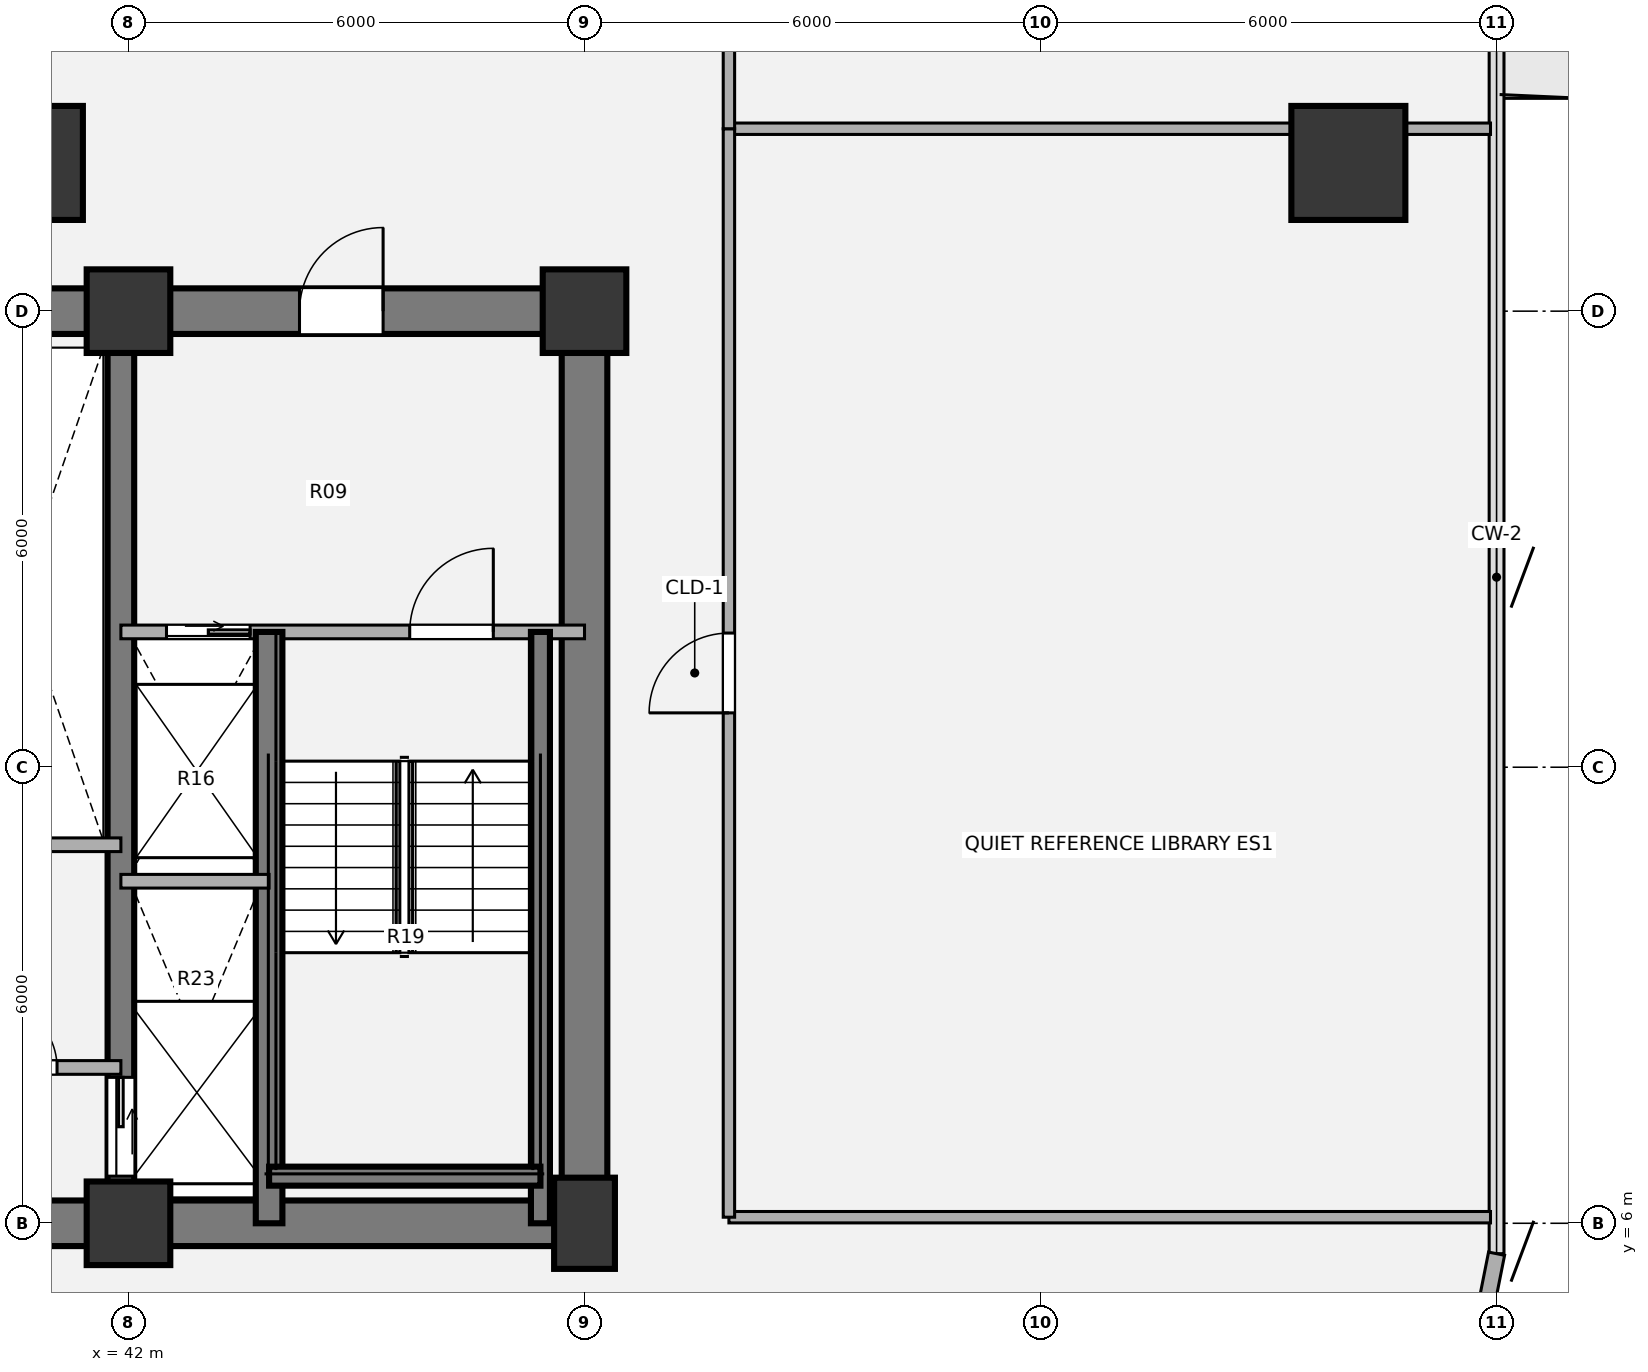
"""IFC4 building model, lengths in metres.
Left out: names, types, materials, properties, quantities, classifications, styles, units other than length and angle.
Written with IfcOpenShell. Run it as: python <this file> out.ifc"""

import sys

from ifc_helpers import new_model, si_unit, direction, frame, frame_2d, origin, origin_2d, place, context, subcontext, project, spatial, rectangle, hollow_circle, extrude, source, transform, mapped, element, fill, save


model = new_model("IFC4")
c1 = context("Model", 3, precision=1e-05, world=origin(), true_north=direction((0.0, 1.0)))
c2 = subcontext(c1, "Body", "Model", "MODEL_VIEW")
j1 = project(units=[si_unit("LENGTHUNIT", "METRE"), si_unit("PLANEANGLEUNIT", "RADIAN")], contexts=[c1])
p1 = place(None, origin())
s1 = spatial("IfcSite", under=j1, at=p1, CompositionType="ELEMENT")
p2 = place(p1, origin())
s2 = spatial("IfcBuilding", under=s1, at=p2, CompositionType="ELEMENT")
p3 = place(p2, frame((0.0, 0.0, 61.02)))
s3 = spatial("IfcBuildingStorey", under=s2, at=p3, CompositionType="ELEMENT", Elevation=61.02)
m1 = source(origin(), c2, "Body", "SweptSolid", [
    extrude(rectangle(XDim=1.1, YDim=1.1, at=origin_2d()), origin(), (0.0, 0.0, 1.0), 3.78),
])
p4 = place(p3, frame((42.0, 6.0, 0.0), z_axis=(0.0, 0.0, 1.0), x_axis=(1.0, 0.0, 0.0)))
e1 = element("IfcColumn", 1, at=p4, inside=s3, PredefinedType="COLUMN", context=c2, shape_type="MappedRepresentation", body=[
    mapped(m1, transform((0.0, 0.0, 0.0), x_axis=(1.0, 0.0, 0.0), y_axis=(0.0, 1.0, 0.0), z_axis=(0.0, 0.0, 1.0), scale=1.0)),
])
m2 = source(origin(), c2, "Body", "SweptSolid", [
    extrude(rectangle(XDim=0.8, YDim=1.2, at=origin_2d()), origin(), (0.0, 0.0, 1.0), 3.78),
])
p5 = place(p3, frame((48.0, 6.0, 0.0), z_axis=(0.0, 0.0, 1.0), x_axis=(1.0, 0.0, 0.0)))
e2 = element("IfcColumn", 2, at=p5, inside=s3, PredefinedType="COLUMN", context=c2, shape_type="MappedRepresentation", body=[
    mapped(m2, transform((0.0, 0.0, 0.0), x_axis=(1.0, 0.0, 0.0), y_axis=(0.0, 1.0, 0.0), z_axis=(0.0, 0.0, 1.0), scale=1.0)),
])
for number, where, z_axis, x_axis in (
    (3, (42.0, 18.0, 0.0), (0.0, 0.0, 1.0), (1.0, 0.0, 0.0)),
    (4, (48.0, 18.0, 0.0), (0.0, 0.0, 1.0), (1.0, 0.0, 0.0)),
):
    element("IfcColumn", number, at=place(p3, frame(where, z_axis=z_axis, x_axis=x_axis)), inside=s3, PredefinedType="COLUMN", context=c2, shape_type="MappedRepresentation", body=[
        mapped(m1, transform((0.0, 0.0, 0.0), x_axis=(1.0, 0.0, 0.0), y_axis=(0.0, 1.0, 0.0), z_axis=(0.0, 0.0, 1.0), scale=1.0)),
    ])
p6 = place(p3, frame((48.3, 6.0, 0.0), z_axis=(0.0, 0.0, 1.0), x_axis=(-1.0, 0.0, 0.0)))
e5 = element("IfcWall", 5, at=p6, inside=s3, PredefinedType="SHEAR", context=c2, shape_type="SweptSolid", body=[
    extrude(rectangle(XDim=24.6, YDim=0.6, at=frame_2d((12.3, 0.0))), origin(), (0.0, 0.0, 1.0), 3.78),
])
p7 = place(p3, frame((48.0, 18.0, 0.0), z_axis=(0.0, 0.0, 1.0), x_axis=(0.0, -1.0, 0.0)))
e6 = element("IfcWall", 6, at=p7, inside=s3, PredefinedType="SHEAR", context=c2, shape_type="SweptSolid", body=[
    extrude(rectangle(XDim=12.0, YDim=0.6, at=frame_2d((6.0, 0.0))), origin(), (0.0, 0.0, 1.0), 3.78),
])
p8 = place(p3, frame((38.8, 18.0, 0.0), z_axis=(0.0, 0.0, 1.0), x_axis=(1.0, 0.0, 0.0)))
e7 = element("IfcWall", 7, at=p8, inside=s3, PredefinedType="SHEAR", context=c2, shape_type="SweptSolid", body=[
    extrude(rectangle(XDim=9.5, YDim=0.6, at=frame_2d((4.75, 0.0))), origin(), (0.0, 0.0, 1.0), 3.78),
])
p9 = place(p8, frame((5.45, 0.0, 0.0)))
e8 = element("IfcOpeningElement", 8, at=p9, cuts=e7, PredefinedType="OPENING", context=c2, shape_type="SweptSolid", body=[
    extrude(rectangle(XDim=1.1, YDim=2.1, at=origin_2d()), frame((0.55, 0.31, 1.05), z_axis=(0.0, -1.0, 0.0), x_axis=(1.0, 0.0, 0.0)), (0.0, 0.0, 1.0), 0.62),
])
p10 = place(p3, frame((41.9, 18.0, 0.0), z_axis=(0.0, 0.0, 1.0), x_axis=(0.0, -1.0, 0.0)))
e9 = element("IfcWall", 9, at=p10, inside=s3, PredefinedType="SHEAR", context=c2, shape_type="SweptSolid", body=[
    extrude(rectangle(XDim=12.0, YDim=0.35, at=frame_2d((6.0, 0.0))), origin(), (0.0, 0.0, 1.0), 3.78),
])
p11 = place(p10, frame((10.08, 0.0, 0.0)))
e10 = element("IfcOpeningElement", 10, at=p11, cuts=e9, PredefinedType="OPENING", context=c2, shape_type="SweptSolid", body=[
    extrude(rectangle(XDim=1.3, YDim=2.1, at=origin_2d()), frame((0.65, 0.185, 1.05), z_axis=(0.0, -1.0, 0.0), x_axis=(1.0, 0.0, 0.0)), (0.0, 0.0, 1.0), 0.37),
])
m3 = source(origin(), c2, "Body", "SweptSolid", [
    extrude(hollow_circle(Radius=0.75, WallThickness=0.05, at=origin_2d()), origin(), (0.0, 0.0, 1.0), 3.78),
])
for number, where, z_axis, x_axis in (
    (11, (58.05, 19.95, 0.0), (0.0, 0.0, 1.0), (1.0, 0.0, 0.0)),
    (12, (40.65, 19.95, 0.0), (0.0, 0.0, 1.0), (1.0, 0.0, 0.0)),
):
    element("IfcColumn", number, at=place(p3, frame(where, z_axis=z_axis, x_axis=x_axis)), inside=s3, PredefinedType="COLUMN", context=c2, shape_type="MappedRepresentation", body=[
        mapped(m3, transform((0.0, 0.0, 0.0), x_axis=(1.0, 0.0, 0.0), y_axis=(0.0, 1.0, 0.0), z_axis=(0.0, 0.0, 1.0), scale=1.0)),
    ])
p12 = place(p3, frame((60.0, 5.6, 0.0), z_axis=(0.0, 0.0, 1.0), x_axis=(-0.195138390419, -0.980775717779, 0.0)))
e13 = element("IfcWall", 13, at=p12, inside=s3, PredefinedType="SOLIDWALL", context=c2, shape_type="SweptSolid", body=[
    extrude(rectangle(XDim=1.249, YDim=0.215, at=frame_2d((0.624, 0.0))), origin(), (0.0, 0.0, 1.0), 3.53),
])
p13 = place(p3, frame((39.35, 10.98, 0.0), z_axis=(0.0, 0.0, 1.0), x_axis=(1.0, 0.0, 0.0)))
e14 = element("IfcWall", 14, at=p13, inside=s3, PredefinedType="PARTITIONING", context=c2, shape_type="SweptSolid", body=[
    extrude(rectangle(XDim=2.55, YDim=0.18, at=frame_2d((1.275, 0.0))), origin(), (0.0, 0.0, 1.0), 3.5),
])
p14 = place(p3, frame((39.35, 8.05, 0.0), z_axis=(0.0, 0.0, 1.0), x_axis=(1.0, 0.0, 0.0)))
e15 = element("IfcWall", 15, at=p14, inside=s3, PredefinedType="PARTITIONING", context=c2, shape_type="SweptSolid", body=[
    extrude(rectangle(XDim=2.55, YDim=0.18, at=frame_2d((1.275, 0.0))), origin(), (0.0, 0.0, 1.0), 3.5),
])
p15 = place(p14, frame((0.85, 0.0, 0.0)))
e16 = element("IfcOpeningElement", 16, at=p15, cuts=e15, PredefinedType="OPENING", context=c2, shape_type="SweptSolid", body=[
    extrude(rectangle(XDim=0.86, YDim=2.1, at=origin_2d()), frame((0.43, 0.1, 1.05), z_axis=(0.0, -1.0, 0.0), x_axis=(1.0, 0.0, 0.0)), (0.0, 0.0, 1.0), 0.2),
])
p16 = place(p3, frame((41.9, 13.78, 0.0), z_axis=(0.0, 0.0, 1.0), x_axis=(1.0, 0.0, 0.0)))
e17 = element("IfcWall", 17, at=p16, inside=s3, PredefinedType="PARTITIONING", context=c2, shape_type="SweptSolid", body=[
    extrude(rectangle(XDim=6.1, YDim=0.18, at=frame_2d((3.05, 0.0))), origin(), (0.0, 0.0, 1.0), 3.5),
])
p17 = place(p16, frame((0.6, 0.0, 0.0)))
e18 = element("IfcOpeningElement", 18, at=p17, cuts=e17, PredefinedType="OPENING", context=c2, shape_type="SweptSolid", body=[
    extrude(rectangle(XDim=1.1, YDim=2.1, at=origin_2d()), frame((0.55, 0.1, 1.05), z_axis=(0.0, -1.0, 0.0), x_axis=(1.0, 0.0, 0.0)), (0.0, 0.0, 1.0), 0.2),
])
p18 = place(p16, frame((3.8, 0.0, 0.0)))
e19 = element("IfcOpeningElement", 19, at=p18, cuts=e17, PredefinedType="OPENING", context=c2, shape_type="SweptSolid", body=[
    extrude(rectangle(XDim=1.1, YDim=2.1, at=origin_2d()), frame((0.55, 0.1, 1.05), z_axis=(0.0, -1.0, 0.0), x_axis=(1.0, 0.0, 0.0)), (0.0, 0.0, 1.0), 0.2),
])
p19 = place(p3, frame((43.85, 6.0, 0.0), z_axis=(0.0, 0.0, 1.0), x_axis=(0.0, 1.0, 0.0)))
e20 = element("IfcWall", 20, at=p19, inside=s3, PredefinedType="SHEAR", context=c2, shape_type="SweptSolid", body=[
    extrude(rectangle(XDim=7.78, YDim=0.35, at=frame_2d((3.89, 0.0))), origin(), (0.0, 0.0, 1.0), 3.85),
])
p20 = place(p3, frame((47.42, 6.0, 0.0), z_axis=(0.0, 0.0, 1.0), x_axis=(0.0, 1.0, 0.0)))
e21 = element("IfcWall", 21, at=p20, inside=s3, PredefinedType="SHEAR", context=c2, shape_type="SweptSolid", body=[
    extrude(rectangle(XDim=7.78, YDim=0.25, at=frame_2d((3.89, 0.0))), origin(), (0.0, 0.0, 1.0), 3.85),
])
p21 = place(p3, frame((43.85, 6.62, 0.0), z_axis=(0.0, 0.0, 1.0), x_axis=(1.0, 0.0, 0.0)))
e22 = element("IfcWall", 22, at=p21, inside=s3, PredefinedType="SHEAR", context=c2, shape_type="SweptSolid", body=[
    extrude(rectangle(XDim=3.57, YDim=0.25, at=frame_2d((1.785, 0.0))), origin(), (0.0, 0.0, 1.0), 3.85),
])
p22 = place(p3, frame((41.9, 10.5, 0.0), z_axis=(0.0, 0.0, 1.0), x_axis=(1.0, 0.0, 0.0)))
e23 = element("IfcWall", 23, at=p22, inside=s3, PredefinedType="PARTITIONING", context=c2, shape_type="SweptSolid", body=[
    extrude(rectangle(XDim=1.95, YDim=0.18, at=frame_2d((0.975, 0.0))), origin(), (0.0, 0.0, 1.0), 3.5),
])
p23 = place(p3, frame((49.9, 6.08, 0.0), z_axis=(0.0, 0.0, 1.0), x_axis=(1.0, 0.0, 0.0)))
e24 = element("IfcWall", 24, at=p23, inside=s3, PredefinedType="PARTITIONING", context=c2, shape_type="SweptSolid", body=[
    extrude(rectangle(XDim=10.02, YDim=0.15, at=frame_2d((5.01, 0.0))), origin(), (0.0, 0.0, 1.0), 3.5),
])
p24 = place(p3, frame((49.9, 20.4, 0.0), z_axis=(0.0, 0.0, 1.0), x_axis=(1.0, 0.0, 0.0)))
e25 = element("IfcWall", 25, at=p24, inside=s3, PredefinedType="PARTITIONING", context=c2, shape_type="SweptSolid", body=[
    extrude(rectangle(XDim=10.02, YDim=0.15, at=frame_2d((5.01, 0.0))), origin(), (0.0, 0.0, 1.0), 2.982),
])
p25 = place(p3, frame((49.9, 6.08, 0.0), z_axis=(0.0, 0.0, 1.0), x_axis=(0.0, 1.0, 0.0)))
e26 = element("IfcWall", 26, at=p25, inside=s3, PredefinedType="PARTITIONING", context=c2, shape_type="SweptSolid", body=[
    extrude(rectangle(XDim=14.32, YDim=0.15, at=frame_2d((7.16, 0.0))), origin(), (0.0, 0.0, 1.0), 3.5),
])
p26 = place(p25, frame((6.635, 0.0, 0.0)))
e27 = element("IfcOpeningElement", 27, at=p26, cuts=e26, PredefinedType="OPENING", context=c2, shape_type="SweptSolid", body=[
    extrude(rectangle(XDim=1.05, YDim=2.1, at=origin_2d()), frame((0.525, 0.085, 1.05), z_axis=(0.0, -1.0, 0.0), x_axis=(1.0, 0.0, 0.0)), (0.0, 0.0, 1.0), 0.17),
])
p27 = place(p3, frame((49.9, 20.4, 0.0), z_axis=(0.0, 0.0, 1.0), x_axis=(0.0, 1.0, 0.0)))
e28 = element("IfcWall", 28, at=p27, inside=s3, PredefinedType="PARTITIONING", context=c2, shape_type="SweptSolid", body=[
    extrude(rectangle(XDim=15.52, YDim=0.15, at=frame_2d((7.76, 0.0))), origin(), (0.0, 0.0, 1.0), 3.5),
])
p28 = place(p27, frame((6.975, 0.0, 0.0)))
e29 = element("IfcOpeningElement", 29, at=p28, cuts=e28, PredefinedType="OPENING", context=c2, shape_type="SweptSolid", body=[
    extrude(rectangle(XDim=1.05, YDim=2.1, at=origin_2d()), frame((0.525, 0.085, 1.05), z_axis=(0.0, -1.0, 0.0), x_axis=(1.0, 0.0, 0.0)), (0.0, 0.0, 1.0), 0.17),
])
m4 = source(origin(), c2, "Body", "SweptSolid", [
    extrude(rectangle(XDim=0.86, YDim=2.1, at=origin_2d()), frame((0.43, 0.025, 1.05), z_axis=(0.0, -1.0, 0.0), x_axis=(1.0, 0.0, 0.0)), (0.0, 0.0, 1.0), 0.05),
])
p29 = place(p15, origin())
e30 = element("IfcDoor", 30, at=p29, inside=s3, OperationType="SINGLE_SWING_LEFT", PredefinedType="DOOR", context=c2, shape_type="MappedRepresentation", body=[
    mapped(m4, transform((0.0, 0.0, 0.0), x_axis=(1.0, 0.0, 0.0), y_axis=(0.0, 1.0, 0.0), z_axis=(0.0, 0.0, 1.0), scale=1.0)),
])
fill(e16, e30)
m5 = source(origin(), c2, "Body", "SweptSolid", [
    extrude(rectangle(XDim=1.1, YDim=2.1, at=origin_2d()), frame((0.55, 0.025, 1.05), z_axis=(0.0, -1.0, 0.0), x_axis=(1.0, 0.0, 0.0)), (0.0, 0.0, 1.0), 0.05),
])
p30 = place(p17, origin())
e31 = element("IfcDoor", 31, at=p30, inside=s3, OperationType="SLIDING_TO_RIGHT", PredefinedType="DOOR", context=c2, shape_type="MappedRepresentation", body=[
    mapped(m5, transform((0.0, 0.0, 0.0), x_axis=(1.0, 0.0, 0.0), y_axis=(0.0, 1.0, 0.0), z_axis=(0.0, 0.0, 1.0), scale=1.0)),
])
fill(e18, e31)
m6 = source(origin(), c2, "Body", "SweptSolid", [
    extrude(rectangle(XDim=1.1, YDim=2.1, at=origin_2d()), frame((0.55, 0.025, 1.05), z_axis=(0.0, -1.0, 0.0), x_axis=(1.0, 0.0, 0.0)), (0.0, 0.0, 1.0), 0.05),
])
p31 = place(p18, origin())
e32 = element("IfcDoor", 32, at=p31, inside=s3, OperationType="SINGLE_SWING_RIGHT", PredefinedType="DOOR", context=c2, shape_type="MappedRepresentation", body=[
    mapped(m6, transform((0.0, 0.0, 0.0), x_axis=(1.0, 0.0, 0.0), y_axis=(0.0, 1.0, 0.0), z_axis=(0.0, 0.0, 1.0), scale=1.0)),
])
fill(e19, e32)
m7 = source(origin(), c2, "Body", "SweptSolid", [
    extrude(rectangle(XDim=1.3, YDim=2.1, at=origin_2d()), frame((0.65, 0.025, 1.05), z_axis=(0.0, -1.0, 0.0), x_axis=(1.0, 0.0, 0.0)), (0.0, 0.0, 1.0), 0.05),
])
p32 = place(p11, origin())
e33 = element("IfcDoor", 33, at=p32, inside=s3, OperationType="SLIDING_TO_LEFT", PredefinedType="DOOR", context=c2, shape_type="MappedRepresentation", body=[
    mapped(m7, transform((0.0, 0.0, 0.0), x_axis=(1.0, 0.0, 0.0), y_axis=(0.0, 1.0, 0.0), z_axis=(0.0, 0.0, 1.0), scale=1.0)),
])
fill(e10, e33)
m8 = source(origin(), c2, "Body", "SweptSolid", [
    extrude(rectangle(XDim=1.1, YDim=2.1, at=origin_2d()), frame((0.55, 0.025, 1.05), z_axis=(0.0, -1.0, 0.0), x_axis=(1.0, 0.0, 0.0)), (0.0, 0.0, 1.0), 0.05),
])
p33 = place(p9, origin())
e34 = element("IfcDoor", 34, at=p33, inside=s3, OperationType="SINGLE_SWING_RIGHT", PredefinedType="DOOR", context=c2, shape_type="MappedRepresentation", body=[
    mapped(m8, transform((0.0, 0.0, 0.0), x_axis=(1.0, 0.0, 0.0), y_axis=(0.0, 1.0, 0.0), z_axis=(0.0, 0.0, 1.0), scale=1.0)),
])
fill(e8, e34)
m9 = source(origin(), c2, "Body", "SweptSolid", [
    extrude(rectangle(XDim=1.05, YDim=2.1, at=origin_2d()), frame((0.525, 0.025, 1.05), z_axis=(0.0, -1.0, 0.0), x_axis=(1.0, 0.0, 0.0)), (0.0, 0.0, 1.0), 0.05),
])
p34 = place(p26, origin())
e35 = element("IfcDoor", 35, at=p34, inside=s3, OperationType="SINGLE_SWING_LEFT", PredefinedType="DOOR", context=c2, shape_type="MappedRepresentation", body=[
    mapped(m9, transform((0.0, 0.0, 0.0), x_axis=(1.0, 0.0, 0.0), y_axis=(0.0, 1.0, 0.0), z_axis=(0.0, 0.0, 1.0), scale=1.0)),
])
fill(e27, e35)
save(model, sys.argv[1])
